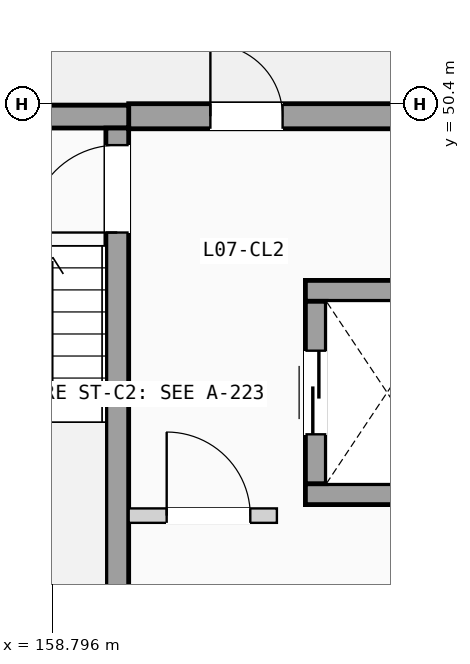
"""IFC4 building model, lengths in metres.
Left out: names, types, materials, properties, quantities, classifications, styles, units other than length and angle.
Written with IfcOpenShell. Run it as: python <this file> out.ifc"""

import sys

from ifc_helpers import new_model, si_unit, direction, frame, frame_2d, origin, place, context, subcontext, project, spatial, rectangle, extrude, element, fill, save


model = new_model("IFC4")
c1 = context("Model", 3, precision=1e-05, world=origin(), true_north=direction((0.0, 1.0)))
c2 = subcontext(c1, "Body", "Model", "MODEL_VIEW")
j1 = project(units=[si_unit("LENGTHUNIT", "METRE"), si_unit("PLANEANGLEUNIT", "RADIAN")], contexts=[c1])
p1 = place(None, origin())
s1 = spatial("IfcSite", under=j1, at=p1, CompositionType="ELEMENT")
p2 = place(p1, origin())
s2 = spatial("IfcBuilding", under=s1, at=p2, CompositionType="ELEMENT")
p3 = place(p2, frame((0.0, 0.0, 24.675)))
s3 = spatial("IfcBuildingStorey", under=s2, at=p3, CompositionType="ELEMENT", Elevation=24.675)
p4 = place(p3, frame((159.8, 50.235, 0.0), z_axis=(0.0, 0.0, 1.0), x_axis=(1.0, 0.0, 0.0)))
e1 = element("IfcWall", 1, at=p4, inside=s3, PredefinedType="SOLIDWALL", context=c2, shape_type="SweptSolid", body=[
    extrude(rectangle(XDim=4.15, YDim=0.33, at=frame_2d((2.075, 0.0))), origin(), (0.0, 0.0, 1.0), 2.9),
])
p5 = place(p4, frame((1.075, 0.0, 0.0)))
e2 = element("IfcOpeningElement", 2, at=p5, cuts=e1, PredefinedType="OPENING", context=c2, shape_type="SweptSolid", body=[
    extrude(rectangle(XDim=0.95, YDim=2.15, at=frame_2d((0.475, 1.075))), frame((0.0, 0.175, 0.0), z_axis=(0.0, -1.0, 0.0), x_axis=(1.0, 0.0, 0.0)), (0.0, 0.0, 1.0), 0.35),
])
p6 = place(p3, frame((156.2, 50.23, 0.0), z_axis=(0.0, 0.0, 1.0), x_axis=(1.0, 0.0, 0.0)))
e3 = element("IfcWall", 3, at=p6, inside=s3, PredefinedType="SHEAR", context=c2, shape_type="SweptSolid", body=[
    extrude(rectangle(XDim=3.6, YDim=0.3, at=frame_2d((1.8, 0.0))), origin(), (0.0, 0.0, 1.0), 2.9),
])
p7 = place(p3, frame((159.65, 43.08, 0.0), z_axis=(0.0, 0.0, 1.0), x_axis=(0.0, 1.0, 0.0)))
e4 = element("IfcWall", 4, at=p7, inside=s3, PredefinedType="SHEAR", context=c2, shape_type="SweptSolid", body=[
    extrude(rectangle(XDim=7.0, YDim=0.3, at=frame_2d((3.5, 0.0))), origin(), (0.0, 0.0, 1.0), 2.9),
])
p8 = place(p7, frame((5.625, 0.0, 0.0)))
e5 = element("IfcOpeningElement", 5, at=p8, cuts=e4, PredefinedType="OPENING", context=c2, shape_type="SweptSolid", body=[
    extrude(rectangle(XDim=1.15, YDim=2.12, at=frame_2d((0.575, 1.06))), frame((0.0, 0.16, 0.0), z_axis=(0.0, -1.0, 0.0), x_axis=(1.0, 0.0, 0.0)), (0.0, 0.0, 1.0), 0.32),
])
for number, where, z_axis, x_axis in (
    (6, (162.125, 45.262, 0.0), (0.0, 0.0, 1.0), (1.0, 0.0, 0.0)),
    (7, (162.125, 47.938, 0.0), (0.0, 0.0, 1.0), (1.0, 0.0, 0.0)),
):
    element("IfcWall", number, at=place(p3, frame(where, z_axis=z_axis, x_axis=x_axis)), inside=s3, PredefinedType="SHEAR", context=c2, shape_type="SweptSolid", body=[
        extrude(rectangle(XDim=2.15, YDim=0.275, at=frame_2d((1.075, 0.0))), origin(), (0.0, 0.0, 1.0), 2.9),
    ])
p9 = place(p3, frame((162.262, 45.4, 0.0), z_axis=(0.0, 0.0, 1.0), x_axis=(0.0, 1.0, 0.0)))
e8 = element("IfcWall", 8, at=p9, inside=s3, PredefinedType="SHEAR", context=c2, shape_type="SweptSolid", body=[
    extrude(rectangle(XDim=2.4, YDim=0.275, at=frame_2d((1.2, 0.0))), origin(), (0.0, 0.0, 1.0), 2.9),
])
p10 = place(p9, frame((0.65, 0.0, 0.0)))
e9 = element("IfcOpeningElement", 9, at=p10, cuts=e8, PredefinedType="OPENING", context=c2, shape_type="SweptSolid", body=[
    extrude(rectangle(XDim=1.1, YDim=2.15, at=frame_2d((0.55, 1.075))), frame((0.0, 0.147, 0.0), z_axis=(0.0, -1.0, 0.0), x_axis=(1.0, 0.0, 0.0)), (0.0, 0.0, 1.0), 0.295),
])
p11 = place(p3, frame((159.8, 44.98, 0.0), z_axis=(0.0, 0.0, 1.0), x_axis=(1.0, 0.0, 0.0)))
e10 = element("IfcWall", 10, at=p11, inside=s3, PredefinedType="PARTITIONING", context=c2, shape_type="SweptSolid", body=[
    extrude(rectangle(XDim=1.95, YDim=0.19, at=frame_2d((0.975, 0.0))), origin(), (0.0, 0.0, 1.0), 2.87),
])
p12 = place(p11, frame((0.5, 0.0, 0.0)))
e11 = element("IfcOpeningElement", 11, at=p12, cuts=e10, PredefinedType="OPENING", context=c2, shape_type="SweptSolid", body=[
    extrude(rectangle(XDim=1.1, YDim=2.12, at=frame_2d((0.55, 1.06))), frame((0.0, 0.105, 0.0), z_axis=(0.0, -1.0, 0.0), x_axis=(1.0, 0.0, 0.0)), (0.0, 0.0, 1.0), 0.21),
])
p13 = place(p5, origin())
e12 = element("IfcDoor", 12, at=p13, inside=s3, OperationType="SINGLE_SWING_LEFT", PredefinedType="DOOR", context=c2, shape_type="SweptSolid", body=[
    extrude(rectangle(XDim=0.95, YDim=2.15, at=frame_2d((0.475, 1.075))), frame((0.0, 0.025, 0.0), z_axis=(0.0, -1.0, 0.0), x_axis=(1.0, 0.0, 0.0)), (0.0, 0.0, 1.0), 0.05),
])
fill(e2, e12)
p14 = place(p8, origin())
e13 = element("IfcDoor", 13, at=p14, inside=s3, OperationType="SINGLE_SWING_LEFT", PredefinedType="DOOR", context=c2, shape_type="SweptSolid", body=[
    extrude(rectangle(XDim=1.15, YDim=2.12, at=frame_2d((0.575, 1.06))), frame((0.0, 0.025, 0.0), z_axis=(0.0, -1.0, 0.0), x_axis=(1.0, 0.0, 0.0)), (0.0, 0.0, 1.0), 0.05),
])
fill(e5, e13)
p15 = place(p10, origin())
e14 = element("IfcDoor", 14, at=p15, inside=s3, OperationType="SLIDING_TO_LEFT", PredefinedType="DOOR", context=c2, shape_type="SweptSolid", body=[
    extrude(rectangle(XDim=1.1, YDim=2.15, at=frame_2d((0.55, 1.075))), frame((0.0, 0.025, 0.0), z_axis=(0.0, -1.0, 0.0), x_axis=(1.0, 0.0, 0.0)), (0.0, 0.0, 1.0), 0.05),
])
fill(e9, e14)
p16 = place(p12, origin())
e15 = element("IfcDoor", 15, at=p16, inside=s3, OperationType="SINGLE_SWING_LEFT", PredefinedType="DOOR", context=c2, shape_type="SweptSolid", body=[
    extrude(rectangle(XDim=1.1, YDim=2.12, at=frame_2d((0.55, 1.06))), frame((0.0, 0.025, 0.0), z_axis=(0.0, -1.0, 0.0), x_axis=(1.0, 0.0, 0.0)), (0.0, 0.0, 1.0), 0.05),
])
fill(e11, e15)
save(model, sys.argv[1])
